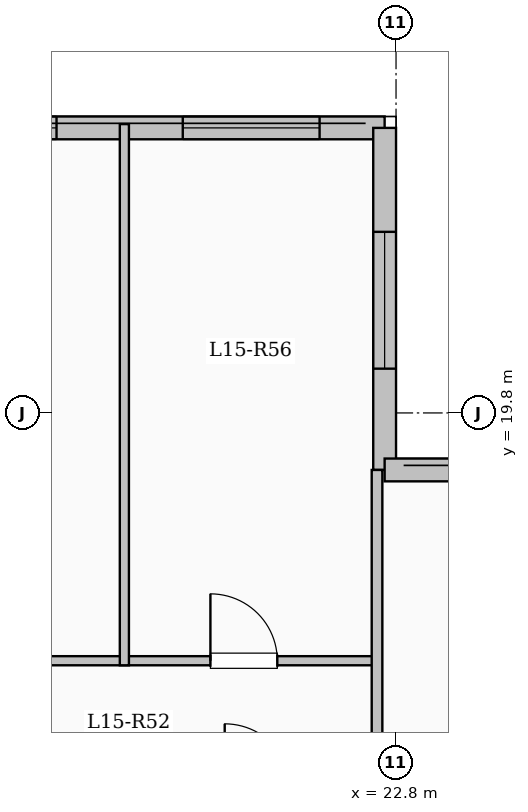
"""IFC4 building model, lengths in metres.
Left out: names, types, materials, properties, quantities, classifications, styles, units other than length and angle.
Written with IfcOpenShell. Run it as: python <this file> out.ifc"""

import sys

from ifc_helpers import new_model, si_unit, direction, frame, frame_2d, origin, place, context, subcontext, project, spatial, rectangle, extrude, element, fill, save


model = new_model("IFC4")
c1 = context("Model", 3, precision=1e-05, world=origin(), true_north=direction((0.0, 1.0)))
c2 = subcontext(c1, "Body", "Model", "MODEL_VIEW")
j1 = project(units=[si_unit("LENGTHUNIT", "METRE"), si_unit("PLANEANGLEUNIT", "RADIAN")], contexts=[c1])
p1 = place(None, origin())
s1 = spatial("IfcSite", under=j1, at=p1, CompositionType="ELEMENT")
p2 = place(p1, origin())
s2 = spatial("IfcBuilding", under=s1, at=p2, CompositionType="ELEMENT")
p3 = place(p2, frame((0.0, 0.0, 57.5)))
s3 = spatial("IfcBuildingStorey", under=s2, at=p3, CompositionType="ELEMENT", Elevation=57.5)
p4 = place(p3, frame((7.35, 23.55, 0.0), z_axis=(0.0, 0.0, 1.0), x_axis=(1.0, 0.0, 0.0)))
e1 = element("IfcWall", 1, at=p4, inside=s3, PredefinedType="SOLIDWALL", context=c2, shape_type="SweptSolid", body=[
    extrude(rectangle(XDim=15.3, YDim=0.3, at=frame_2d((7.65, 0.0))), origin(), (0.0, 0.0, 1.0), 3.1),
])
p5 = place(p4, frame((0.205, 0.0, 0.95)))
e2 = element("IfcOpeningElement", 2, at=p5, cuts=e1, PredefinedType="OPENING", context=c2, shape_type="SweptSolid", body=[
    extrude(rectangle(XDim=0.85, YDim=1.5, at=frame_2d((0.425, 0.75))), frame((0.0, 0.16, 0.0), z_axis=(0.0, -1.0, 0.0), x_axis=(1.0, 0.0, 0.0)), (0.0, 0.0, 1.0), 0.32),
])
p6 = place(p4, frame((2.209, 0.0, 0.95)))
e3 = element("IfcOpeningElement", 3, at=p6, cuts=e1, PredefinedType="OPENING", context=c2, shape_type="SweptSolid", body=[
    extrude(rectangle(XDim=1.2, YDim=1.5, at=frame_2d((0.6, 0.75))), frame((0.0, 0.16, 0.0), z_axis=(0.0, -1.0, 0.0), x_axis=(1.0, 0.0, 0.0)), (0.0, 0.0, 1.0), 0.32),
])
p7 = place(p4, frame((5.196, 0.0, 0.9)))
e4 = element("IfcOpeningElement", 4, at=p7, cuts=e1, PredefinedType="OPENING", context=c2, shape_type="SweptSolid", body=[
    extrude(rectangle(XDim=2.4, YDim=1.8, at=frame_2d((1.2, 0.9))), frame((0.0, 0.16, 0.0), z_axis=(0.0, -1.0, 0.0), x_axis=(1.0, 0.0, 0.0)), (0.0, 0.0, 1.0), 0.32),
])
p8 = place(p4, frame((9.483, 0.0, 0.9)))
e5 = element("IfcOpeningElement", 5, at=p8, cuts=e1, PredefinedType="OPENING", context=c2, shape_type="SweptSolid", body=[
    extrude(rectangle(XDim=1.5, YDim=1.65, at=frame_2d((0.75, 0.825))), frame((0.0, 0.16, 0.0), z_axis=(0.0, -1.0, 0.0), x_axis=(1.0, 0.0, 0.0)), (0.0, 0.0, 1.0), 0.32),
])
p9 = place(p4, frame((12.644, 0.0, 0.9)))
e6 = element("IfcOpeningElement", 6, at=p9, cuts=e1, PredefinedType="OPENING", context=c2, shape_type="SweptSolid", body=[
    extrude(rectangle(XDim=1.8, YDim=1.65, at=frame_2d((0.9, 0.825))), frame((0.0, 0.16, 0.0), z_axis=(0.0, -1.0, 0.0), x_axis=(1.0, 0.0, 0.0)), (0.0, 0.0, 1.0), 0.32),
])
p10 = place(p3, frame((22.65, 23.55, 0.0), z_axis=(0.0, 0.0, 1.0), x_axis=(0.0, -1.0, 0.0)))
e7 = element("IfcWall", 7, at=p10, inside=s3, PredefinedType="SOLIDWALL", context=c2, shape_type="SweptSolid", body=[
    extrude(rectangle(XDim=4.5, YDim=0.3, at=frame_2d((2.25, 0.0))), origin(), (0.0, 0.0, 1.0), 3.1),
])
p11 = place(p10, frame((1.367, 0.0, 0.9)))
e8 = element("IfcOpeningElement", 8, at=p11, cuts=e7, PredefinedType="OPENING", context=c2, shape_type="SweptSolid", body=[
    extrude(rectangle(XDim=1.8, YDim=1.65, at=frame_2d((0.9, 0.825))), frame((0.0, 0.16, 0.0), z_axis=(0.0, -1.0, 0.0), x_axis=(1.0, 0.0, 0.0)), (0.0, 0.0, 1.0), 0.32),
])
p12 = place(p3, frame((22.65, 19.05, 0.0), z_axis=(0.0, 0.0, 1.0), x_axis=(1.0, 0.0, 0.0)))
e9 = element("IfcWall", 9, at=p12, inside=s3, PredefinedType="SOLIDWALL", context=c2, shape_type="SweptSolid", body=[
    extrude(rectangle(XDim=6.0, YDim=0.3, at=frame_2d((3.0, 0.0))), origin(), (0.0, 0.0, 1.0), 3.1),
])
p13 = place(p12, frame((1.975, 0.0, 0.9)))
e10 = element("IfcOpeningElement", 10, at=p13, cuts=e9, PredefinedType="OPENING", context=c2, shape_type="SweptSolid", body=[
    extrude(rectangle(XDim=2.0, YDim=1.7, at=frame_2d((1.0, 0.85))), frame((0.0, 0.16, 0.0), z_axis=(0.0, -1.0, 0.0), x_axis=(1.0, 0.0, 0.0)), (0.0, 0.0, 1.0), 0.32),
])
p14 = place(p3, frame((15.902, 16.54, 0.0), z_axis=(0.0, 0.0, 1.0), x_axis=(1.0, 0.0, 0.0)))
e11 = element("IfcWall", 11, at=p14, inside=s3, PredefinedType="PARTITIONING", context=c2, shape_type="SweptSolid", body=[
    extrude(rectangle(XDim=6.708, YDim=0.12, at=frame_2d((3.354, 0.0))), origin(), (0.0, 0.0, 1.0), 3.1),
])
p15 = place(p14, frame((1.192, 0.0, 0.0)))
e12 = element("IfcOpeningElement", 12, at=p15, cuts=e11, PredefinedType="OPENING", context=c2, shape_type="SweptSolid", body=[
    extrude(rectangle(XDim=0.88, YDim=2.1, at=frame_2d((0.44, 1.05))), frame((0.0, 0.07, 0.0), z_axis=(0.0, -1.0, 0.0), x_axis=(1.0, 0.0, 0.0)), (0.0, 0.0, 1.0), 0.14),
])
p16 = place(p14, frame((4.456, 0.0, 0.0)))
e13 = element("IfcOpeningElement", 13, at=p16, cuts=e11, PredefinedType="OPENING", context=c2, shape_type="SweptSolid", body=[
    extrude(rectangle(XDim=0.88, YDim=2.1, at=frame_2d((0.44, 1.05))), frame((0.0, 0.07, 0.0), z_axis=(0.0, -1.0, 0.0), x_axis=(1.0, 0.0, 0.0)), (0.0, 0.0, 1.0), 0.14),
])
p17 = place(p3, frame((19.226, 16.48, 0.0), z_axis=(0.0, 0.0, 1.0), x_axis=(0.0, 1.0, 0.0)))
e14 = element("IfcWall", 14, at=p17, inside=s3, PredefinedType="PARTITIONING", context=c2, shape_type="SweptSolid", body=[
    extrude(rectangle(XDim=7.12, YDim=0.12, at=frame_2d((3.56, 0.0))), origin(), (0.0, 0.0, 1.0), 3.1),
])
p18 = place(p3, frame((22.55, 12.5, 0.0), z_axis=(0.0, 0.0, 1.0), x_axis=(0.0, 1.0, 0.0)))
e15 = element("IfcWall", 15, at=p18, inside=s3, PredefinedType="PARTITIONING", context=c2, shape_type="SweptSolid", body=[
    extrude(rectangle(XDim=6.55, YDim=0.14, at=frame_2d((3.275, 0.0))), origin(), (0.0, 0.0, 1.0), 3.1),
])
p19 = place(p8, origin())
e16 = element("IfcWindow", 16, at=p19, inside=s3, PartitioningType="SINGLE_PANEL", PredefinedType="WINDOW", context=c2, shape_type="SweptSolid", body=[
    extrude(rectangle(XDim=1.5, YDim=1.65, at=frame_2d((0.75, 0.825))), frame((0.0, 0.03, 0.0), z_axis=(0.0, -1.0, 0.0), x_axis=(1.0, 0.0, 0.0)), (0.0, 0.0, 1.0), 0.06),
])
fill(e5, e16)
p20 = place(p9, origin())
e17 = element("IfcWindow", 17, at=p20, inside=s3, PartitioningType="SINGLE_PANEL", PredefinedType="WINDOW", context=c2, shape_type="SweptSolid", body=[
    extrude(rectangle(XDim=1.8, YDim=1.65, at=frame_2d((0.9, 0.825))), frame((0.0, 0.03, 0.0), z_axis=(0.0, -1.0, 0.0), x_axis=(1.0, 0.0, 0.0)), (0.0, 0.0, 1.0), 0.06),
])
fill(e6, e17)
p21 = place(p11, origin())
e18 = element("IfcWindow", 18, at=p21, inside=s3, PartitioningType="SINGLE_PANEL", PredefinedType="WINDOW", context=c2, shape_type="SweptSolid", body=[
    extrude(rectangle(XDim=1.8, YDim=1.65, at=frame_2d((0.9, 0.825))), frame((0.0, 0.03, 0.0), z_axis=(0.0, -1.0, 0.0), x_axis=(1.0, 0.0, 0.0)), (0.0, 0.0, 1.0), 0.06),
])
fill(e8, e18)
p22 = place(p16, origin())
e19 = element("IfcDoor", 19, at=p22, inside=s3, OperationType="SINGLE_SWING_LEFT", PredefinedType="DOOR", context=c2, shape_type="SweptSolid", body=[
    extrude(rectangle(XDim=0.88, YDim=2.1, at=frame_2d((0.44, 1.05))), frame((0.0, 0.025, 0.0), z_axis=(0.0, -1.0, 0.0), x_axis=(1.0, 0.0, 0.0)), (0.0, 0.0, 1.0), 0.05),
])
fill(e13, e19)
save(model, sys.argv[1])
